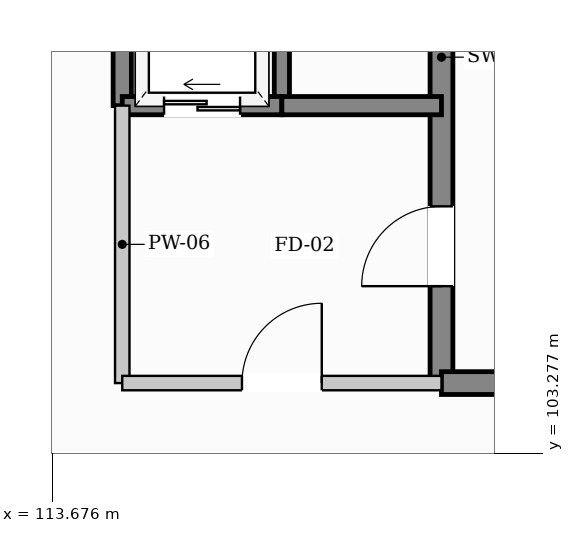
"""IFC4 building model, lengths in metres.
Left out: names, types, materials, properties, quantities, classifications, styles, units other than length and angle.
Written with IfcOpenShell. Run it as: python <this file> out.ifc"""

import sys

from ifc_helpers import new_model, si_unit, direction, frame, frame_2d, origin, place, context, subcontext, project, spatial, rectangle, extrude, element, fill, save


model = new_model("IFC4")
c1 = context("Model", 3, precision=1e-05, world=origin(), true_north=direction((0.0, 1.0)))
c2 = subcontext(c1, "Body", "Model", "MODEL_VIEW")
j1 = project(units=[si_unit("LENGTHUNIT", "METRE"), si_unit("PLANEANGLEUNIT", "RADIAN")], contexts=[c1])
p1 = place(None, origin())
s1 = spatial("IfcSite", under=j1, at=p1, CompositionType="ELEMENT")
p2 = place(p1, origin())
s2 = spatial("IfcBuilding", under=s1, at=p2, CompositionType="ELEMENT")
p3 = place(p2, frame((0.0, 0.0, -4.2)))
s3 = spatial("IfcBuildingStorey", under=s2, at=p3, CompositionType="ELEMENT", Elevation=-4.2)
p4 = place(p3, frame((118.8, 104.2, 0.0), z_axis=(0.0, 0.0, 1.0), x_axis=(0.0, 1.0, 0.0)))
e1 = element("IfcWall", 1, at=p4, inside=s3, PredefinedType="SHEAR", context=c2, shape_type="SweptSolid", body=[
    extrude(rectangle(XDim=6.0, YDim=0.3, at=frame_2d((3.0, 0.0))), origin(), (0.0, 0.0, 1.0), 3.84),
])
p5 = place(p4, frame((1.275, 0.0, 0.0)))
e2 = element("IfcOpeningElement", 2, at=p5, cuts=e1, PredefinedType="OPENING", context=c2, shape_type="SweptSolid", body=[
    extrude(rectangle(XDim=1.05, YDim=2.15, at=frame_2d((0.525, 1.075))), frame((0.0, 0.16, 0.0), z_axis=(0.0, -1.0, 0.0), x_axis=(1.0, 0.0, 0.0)), (0.0, 0.0, 1.0), 0.32),
])
p6 = place(p3, frame((118.8, 104.2, 0.0), z_axis=(0.0, 0.0, 1.0), x_axis=(1.0, 0.0, 0.0)))
e3 = element("IfcWall", 3, at=p6, inside=s3, PredefinedType="SHEAR", context=c2, shape_type="SweptSolid", body=[
    extrude(rectangle(XDim=7.0, YDim=0.3, at=frame_2d((3.5, 0.0))), origin(), (0.0, 0.0, 1.0), 3.84),
])
p7 = place(p3, frame((114.6, 107.85, 0.0), z_axis=(0.0, 0.0, 1.0), x_axis=(0.0, 1.0, 0.0)))
e4 = element("IfcWall", 4, at=p7, inside=s3, PredefinedType="SHEAR", context=c2, shape_type="SweptSolid", body=[
    extrude(rectangle(XDim=2.35, YDim=0.24, at=frame_2d((1.175, 0.0))), origin(), (0.0, 0.0, 1.0), 3.84),
])
p8 = place(p3, frame((116.7, 107.85, 0.0), z_axis=(0.0, 0.0, 1.0), x_axis=(0.0, 1.0, 0.0)))
e5 = element("IfcWall", 5, at=p8, inside=s3, PredefinedType="SHEAR", context=c2, shape_type="SweptSolid", body=[
    extrude(rectangle(XDim=2.35, YDim=0.2, at=frame_2d((1.175, 0.0))), origin(), (0.0, 0.0, 1.0), 3.84),
])
p9 = place(p3, frame((114.6, 107.85, 0.0), z_axis=(0.0, 0.0, 1.0), x_axis=(1.0, 0.0, 0.0)))
e6 = element("IfcWall", 6, at=p9, inside=s3, PredefinedType="SHEAR", context=c2, shape_type="SweptSolid", body=[
    extrude(rectangle(XDim=2.1, YDim=0.24, at=frame_2d((1.05, 0.0))), origin(), (0.0, 0.0, 1.0), 3.84),
])
p10 = place(p9, frame((0.55, 0.0, 0.0)))
e7 = element("IfcOpeningElement", 7, at=p10, cuts=e6, PredefinedType="OPENING", context=c2, shape_type="SweptSolid", body=[
    extrude(rectangle(XDim=1.0, YDim=2.1, at=frame_2d((0.5, 1.05))), frame((0.0, 0.13, 0.0), z_axis=(0.0, -1.0, 0.0), x_axis=(1.0, 0.0, 0.0)), (0.0, 0.0, 1.0), 0.26),
])
p11 = place(p3, frame((116.7, 107.85, 0.0), z_axis=(0.0, 0.0, 1.0), x_axis=(1.0, 0.0, 0.0)))
e8 = element("IfcWall", 8, at=p11, inside=s3, PredefinedType="SHEAR", context=c2, shape_type="SweptSolid", body=[
    extrude(rectangle(XDim=2.1, YDim=0.24, at=frame_2d((1.05, 0.0))), origin(), (0.0, 0.0, 1.0), 3.84),
])
p12 = place(p3, frame((114.6, 104.2, 0.0), z_axis=(0.0, 0.0, 1.0), x_axis=(0.0, 1.0, 0.0)))
e9 = element("IfcWall", 9, at=p12, inside=s3, PredefinedType="PARTITIONING", context=c2, shape_type="SweptSolid", body=[
    extrude(rectangle(XDim=3.65, YDim=0.19, at=frame_2d((1.825, 0.0))), origin(), (0.0, 0.0, 1.0), 3.84),
])
p13 = place(p3, frame((114.6, 104.2, 0.0), z_axis=(0.0, 0.0, 1.0), x_axis=(1.0, 0.0, 0.0)))
e10 = element("IfcWall", 10, at=p13, inside=s3, PredefinedType="PARTITIONING", context=c2, shape_type="SweptSolid", body=[
    extrude(rectangle(XDim=4.2, YDim=0.19, at=frame_2d((2.1, 0.0))), origin(), (0.0, 0.0, 1.0), 3.84),
])
p14 = place(p13, frame((1.575, 0.0, 0.0)))
e11 = element("IfcOpeningElement", 11, at=p14, cuts=e10, PredefinedType="OPENING", context=c2, shape_type="SweptSolid", body=[
    extrude(rectangle(XDim=1.05, YDim=2.15, at=frame_2d((0.525, 1.075))), frame((0.0, 0.105, 0.0), z_axis=(0.0, -1.0, 0.0), x_axis=(1.0, 0.0, 0.0)), (0.0, 0.0, 1.0), 0.21),
])
p15 = place(p5, origin())
e12 = element("IfcDoor", 12, at=p15, inside=s3, OperationType="SINGLE_SWING_LEFT", PredefinedType="DOOR", context=c2, shape_type="SweptSolid", body=[
    extrude(rectangle(XDim=1.05, YDim=2.15, at=frame_2d((0.525, 1.075))), frame((0.0, 0.025, 0.0), z_axis=(0.0, -1.0, 0.0), x_axis=(1.0, 0.0, 0.0)), (0.0, 0.0, 1.0), 0.05),
])
fill(e2, e12)
p16 = place(p10, origin())
e13 = element("IfcDoor", 13, at=p16, inside=s3, OperationType="SLIDING_TO_LEFT", PredefinedType="DOOR", context=c2, shape_type="SweptSolid", body=[
    extrude(rectangle(XDim=1.0, YDim=2.1, at=frame_2d((0.5, 1.05))), frame((0.0, 0.025, 0.0), z_axis=(0.0, -1.0, 0.0), x_axis=(1.0, 0.0, 0.0)), (0.0, 0.0, 1.0), 0.05),
])
fill(e7, e13)
p17 = place(p14, origin())
e14 = element("IfcDoor", 14, at=p17, inside=s3, OperationType="SINGLE_SWING_RIGHT", PredefinedType="DOOR", context=c2, shape_type="SweptSolid", body=[
    extrude(rectangle(XDim=1.05, YDim=2.15, at=frame_2d((0.525, 1.075))), frame((0.0, 0.025, 0.0), z_axis=(0.0, -1.0, 0.0), x_axis=(1.0, 0.0, 0.0)), (0.0, 0.0, 1.0), 0.05),
])
fill(e11, e14)
save(model, sys.argv[1])
